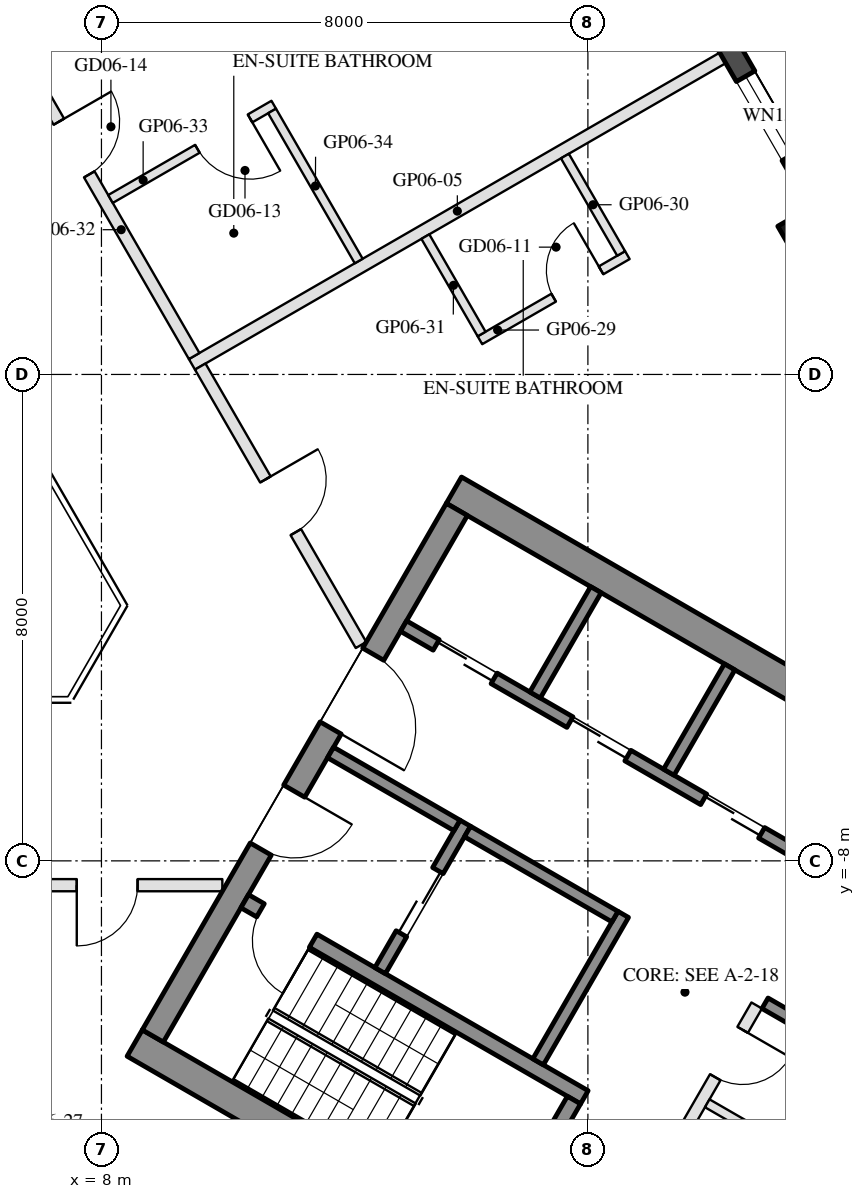
"""IFC4 building model, lengths in metres.
Left out: names, types, materials, properties, quantities, classifications, styles, units other than length and angle.
Written with IfcOpenShell. Run it as: python <this file> out.ifc"""

import sys

from ifc_helpers import new_model, si_unit, direction, frame, frame_2d, origin, origin_2d, place, context, subcontext, project, spatial, rectangle, hollow_rectangle, extrude, element, fill, save


model = new_model("IFC4")
c1 = context("Model", 3, precision=1e-05, world=origin(), true_north=direction((0.0, 1.0)))
c2 = subcontext(c1, "Body", "Model", "MODEL_VIEW")
j1 = project(units=[si_unit("LENGTHUNIT", "METRE"), si_unit("PLANEANGLEUNIT", "RADIAN")], contexts=[c1])
p1 = place(None, origin())
s1 = spatial("IfcSite", under=j1, at=p1, CompositionType="ELEMENT")
p2 = place(p1, origin())
s2 = spatial("IfcBuilding", under=s1, at=p2, CompositionType="ELEMENT")
p3 = place(p2, frame((0.0, 0.0, 87.2)))
s3 = spatial("IfcBuildingStorey", under=s2, at=p3, CompositionType="ELEMENT", Elevation=87.2)
p4 = place(p3, frame((19.738, 2.273, 0.0), z_axis=(0.0, 0.0, 1.0), x_axis=(-0.5, 0.866025403784, 0.0)))
e1 = element("IfcColumn", 1, at=p4, inside=s3, PredefinedType="COLUMN", context=c2, shape_type="SweptSolid", body=[
    extrude(hollow_rectangle(XDim=0.9, YDim=0.9, WallThickness=0.04, at=origin_2d()), origin(), (0.0, 0.0, 1.0), 3.7),
])
p5 = place(p3, frame((19.729, 2.938, 0.0), z_axis=(0.0, 0.0, 1.0), x_axis=(-0.499976430342, 0.866039011305, 0.0)))
e2 = element("IfcWall", 2, at=p5, inside=s3, PredefinedType="SOLIDWALL", context=c2, shape_type="SweptSolid", body=[
    extrude(rectangle(XDim=6.74, YDim=0.35, at=frame_2d((3.37, 0.0))), origin(), (0.0, 0.0, 1.0), 3.55),
])
p6 = place(p5, frame((0.77, 0.0, 0.3)))
e3 = element("IfcOpeningElement", 3, at=p6, cuts=e2, PredefinedType="OPENING", context=c2, shape_type="SweptSolid", body=[
    extrude(rectangle(XDim=1.5, YDim=2.65, at=frame_2d((0.75, 1.325))), frame((0.0, 0.185, 0.0), z_axis=(0.0, -1.0, 0.0), x_axis=(1.0, 0.0, 0.0)), (0.0, 0.0, 1.0), 0.37),
])
p7 = place(p5, frame((3.37, 0.0, 0.0)))
e4 = element("IfcOpeningElement", 4, at=p7, cuts=e2, PredefinedType="OPENING", context=c2, shape_type="SweptSolid", body=[
    extrude(rectangle(XDim=2.4, YDim=2.4, at=frame_2d((1.2, 1.2))), frame((0.0, 0.185, 0.0), z_axis=(0.0, -1.0, 0.0), x_axis=(1.0, 0.0, 0.0)), (0.0, 0.0, 1.0), 0.37),
])
for number, where, z_axis, x_axis in (
    (5, (8.547, -10.997, 0.0), (0.0, 0.0, 1.0), (0.866, -0.5, 0.0)),
    (6, (13.797, -1.903, 0.0), (0.0, 0.0, 1.0), (0.866, -0.5, 0.0)),
):
    element("IfcWall", number, at=place(p3, frame(where, z_axis=z_axis, x_axis=x_axis)), inside=s3, PredefinedType="SHEAR", context=c2, shape_type="SweptSolid", body=[
        extrude(rectangle(XDim=14.837, YDim=0.5, at=frame_2d((7.418, 0.0))), origin(), (0.0, 0.0, 1.0), 3.5),
    ])
p8 = place(p3, frame((8.845, -10.88, 0.0), z_axis=(0.0, 0.0, 1.0), x_axis=(0.500004234368, 0.866022959057, 0.0)))
e7 = element("IfcWall", 7, at=p8, inside=s3, PredefinedType="SHEAR", context=c2, shape_type="SweptSolid", body=[
    extrude(rectangle(XDim=10.0, YDim=0.4, at=frame_2d((5.0, 0.0))), origin(), (0.0, 0.0, 1.0), 3.5),
])
p9 = place(p8, frame((3.55, 0.0, 0.0)))
e8 = element("IfcOpeningElement", 8, at=p9, cuts=e7, PredefinedType="OPENING", context=c2, shape_type="SweptSolid", body=[
    extrude(rectangle(XDim=1.1, YDim=2.1, at=frame_2d((0.55, 1.05))), frame((0.0, 0.21, 0.0), z_axis=(0.0, -1.0, 0.0), x_axis=(1.0, 0.0, 0.0)), (0.0, 0.0, 1.0), 0.42),
])
p10 = place(p8, frame((5.85, 0.0, 0.0)))
e9 = element("IfcOpeningElement", 9, at=p10, cuts=e7, PredefinedType="OPENING", context=c2, shape_type="SweptSolid", body=[
    extrude(rectangle(XDim=1.4, YDim=2.1, at=frame_2d((0.7, 1.05))), frame((0.0, 0.21, 0.0), z_axis=(0.0, -1.0, 0.0), x_axis=(1.0, 0.0, 0.0)), (0.0, 0.0, 1.0), 0.42),
])
p11 = place(p3, frame((10.356, -8.664, 0.0), z_axis=(0.0, 0.0, 1.0), x_axis=(0.866028629588, -0.499994412703, 0.0)))
e10 = element("IfcWall", 10, at=p11, inside=s3, PredefinedType="SHEAR", context=c2, shape_type="SweptSolid", body=[
    extrude(rectangle(XDim=6.45, YDim=0.25, at=frame_2d((3.225, 0.0))), origin(), (0.0, 0.0, 1.0), 3.5),
])
p12 = place(p11, frame((0.3, 0.0, 0.0)))
e11 = element("IfcOpeningElement", 11, at=p12, cuts=e10, PredefinedType="OPENING", context=c2, shape_type="SweptSolid", body=[
    extrude(rectangle(XDim=1.0, YDim=2.1, at=frame_2d((0.5, 1.05))), frame((0.0, 0.135, 0.0), z_axis=(0.0, -1.0, 0.0), x_axis=(1.0, 0.0, 0.0)), (0.0, 0.0, 1.0), 0.27),
])
p13 = place(p3, frame((14.496, -14.143, 0.0), z_axis=(0.0, 0.0, 1.0), x_axis=(0.500062241894, 0.865989465428, 0.0)))
e12 = element("IfcWall", 12, at=p13, inside=s3, PredefinedType="SHEAR", context=c2, shape_type="SweptSolid", body=[
    extrude(rectangle(XDim=2.55, YDim=0.25, at=frame_2d((1.275, 0.0))), origin(), (0.0, 0.0, 1.0), 3.5),
])
p14 = place(p3, frame((15.181, -11.305, 0.0), z_axis=(0.0, 0.0, 1.0), x_axis=(0.49994636267, 0.866056369097, 0.0)))
e13 = element("IfcWall", 13, at=p14, inside=s3, PredefinedType="SHEAR", context=c2, shape_type="SweptSolid", body=[
    extrude(rectangle(XDim=2.8, YDim=0.2, at=frame_2d((1.4, 0.0))), origin(), (0.0, 0.0, 1.0), 3.5),
])
p15 = place(p3, frame((12.583, -9.805, 0.0), z_axis=(0.0, 0.0, 1.0), x_axis=(0.49994636267, 0.866056369097, 0.0)))
e14 = element("IfcWall", 14, at=p15, inside=s3, PredefinedType="SHEAR", context=c2, shape_type="SweptSolid", body=[
    extrude(rectangle(XDim=2.8, YDim=0.2, at=frame_2d((1.4, 0.0))), origin(), (0.0, 0.0, 1.0), 3.5),
])
p16 = place(p15, frame((0.7, 0.0, 0.0)))
e15 = element("IfcOpeningElement", 15, at=p16, cuts=e14, PredefinedType="OPENING", context=c2, shape_type="SweptSolid", body=[
    extrude(rectangle(XDim=1.2, YDim=2.1, at=frame_2d((0.6, 1.05))), frame((0.0, 0.11, 0.0), z_axis=(0.0, -1.0, 0.0), x_axis=(1.0, 0.0, 0.0)), (0.0, 0.0, 1.0), 0.22),
])
p17 = place(p3, frame((11.768, -6.217, 0.0), z_axis=(0.0, 0.0, 1.0), x_axis=(0.866050077142, -0.499957262057, 0.0)))
e16 = element("IfcWall", 16, at=p17, inside=s3, PredefinedType="SHEAR", context=c2, shape_type="SweptSolid", body=[
    extrude(rectangle(XDim=2.4, YDim=0.2, at=frame_2d((1.2, 0.0))), origin(), (0.0, 0.0, 1.0), 3.5),
])
p18 = place(p3, frame((14.02, -7.517, 0.0), z_axis=(0.0, 0.0, 1.0), x_axis=(0.866034573852, -0.49998411664, 0.0)))
e17 = element("IfcWall", 17, at=p18, inside=s3, PredefinedType="SHEAR", context=c2, shape_type="SweptSolid", body=[
    extrude(rectangle(XDim=2.8, YDim=0.2, at=frame_2d((1.4, 0.0))), origin(), (0.0, 0.0, 1.0), 3.5),
])
p19 = place(p3, frame((12.968, -4.138, 0.0), z_axis=(0.0, 0.0, 1.0), x_axis=(0.866028328073, -0.49999493495, 0.0)))
e18 = element("IfcWall", 18, at=p19, inside=s3, PredefinedType="SHEAR", context=c2, shape_type="SweptSolid", body=[
    extrude(rectangle(XDim=10.16, YDim=0.2, at=frame_2d((5.08, 0.0))), origin(), (0.0, 0.0, 1.0), 3.5),
])
p20 = place(p19, frame((0.62, 0.0, 0.0)))
e19 = element("IfcOpeningElement", 19, at=p20, cuts=e18, PredefinedType="OPENING", context=c2, shape_type="SweptSolid", body=[
    extrude(rectangle(XDim=1.1, YDim=2.1, at=frame_2d((0.55, 1.05))), frame((0.0, 0.11, 0.0), z_axis=(0.0, -1.0, 0.0), x_axis=(1.0, 0.0, 0.0)), (0.0, 0.0, 1.0), 0.22),
])
p21 = place(p19, frame((3.16, 0.0, 0.0)))
e20 = element("IfcOpeningElement", 20, at=p21, cuts=e18, PredefinedType="OPENING", context=c2, shape_type="SweptSolid", body=[
    extrude(rectangle(XDim=1.1, YDim=2.1, at=frame_2d((0.55, 1.05))), frame((0.0, 0.11, 0.0), z_axis=(0.0, -1.0, 0.0), x_axis=(1.0, 0.0, 0.0)), (0.0, 0.0, 1.0), 0.22),
])
p22 = place(p19, frame((5.7, 0.0, 0.0)))
e21 = element("IfcOpeningElement", 21, at=p22, cuts=e18, PredefinedType="OPENING", context=c2, shape_type="SweptSolid", body=[
    extrude(rectangle(XDim=1.1, YDim=2.1, at=frame_2d((0.55, 1.05))), frame((0.0, 0.11, 0.0), z_axis=(0.0, -1.0, 0.0), x_axis=(1.0, 0.0, 0.0)), (0.0, 0.0, 1.0), 0.22),
])
p23 = place(p19, frame((8.24, 0.0, 0.0)))
e22 = element("IfcOpeningElement", 22, at=p23, cuts=e18, PredefinedType="OPENING", context=c2, shape_type="SweptSolid", body=[
    extrude(rectangle(XDim=1.1, YDim=2.1, at=frame_2d((0.55, 1.05))), frame((0.0, 0.11, 0.0), z_axis=(0.0, -1.0, 0.0), x_axis=(1.0, 0.0, 0.0)), (0.0, 0.0, 1.0), 0.22),
])
p24 = place(p3, frame((18.913, -10.342, 0.0), z_axis=(0.0, 0.0, 1.0), x_axis=(0.866038183914, -0.499977863513, 0.0)))
e23 = element("IfcWall", 23, at=p24, inside=s3, PredefinedType="SHEAR", context=c2, shape_type="SweptSolid", body=[
    extrude(rectangle(XDim=1.71, YDim=0.2, at=frame_2d((0.855, 0.0))), origin(), (0.0, 0.0, 1.0), 3.5),
])
for number, where, z_axis, x_axis in (
    (24, (15.131, -5.272, 0.0), (0.0, 0.0, 1.0), (0.5, 0.866, 0.0)),
    (25, (17.331, -6.542, 0.0), (0.0, 0.0, 1.0), (0.5, 0.866, 0.0)),
):
    element("IfcWall", number, at=place(p3, frame(where, z_axis=z_axis, x_axis=x_axis)), inside=s3, PredefinedType="SHEAR", context=c2, shape_type="SweptSolid", body=[
        extrude(rectangle(XDim=2.0, YDim=0.2, at=frame_2d((1.0, 0.0))), origin(), (0.0, 0.0, 1.0), 3.5),
    ])
p25 = place(p3, frame((16.076, -15.055, 0.0), z_axis=(0.0, 0.0, 1.0), x_axis=(0.499995103361, 0.866028230842, 0.0)))
e26 = element("IfcWall", 26, at=p25, inside=s3, PredefinedType="PARTITIONING", context=c2, shape_type="SweptSolid", body=[
    extrude(rectangle(XDim=5.4, YDim=0.2, at=frame_2d((2.7, 0.0))), origin(), (0.0, 0.0, 1.0), 3.5),
])
p26 = place(p25, frame((2.163, 0.0, 0.0)))
e27 = element("IfcOpeningElement", 27, at=p26, cuts=e26, PredefinedType="OPENING", context=c2, shape_type="SweptSolid", body=[
    extrude(rectangle(XDim=0.9, YDim=2.1, at=frame_2d((0.45, 1.05))), frame((0.0, 0.11, 0.0), z_axis=(0.0, -1.0, 0.0), x_axis=(1.0, 0.0, 0.0)), (0.0, 0.0, 1.0), 0.22),
])
p27 = place(p25, frame((4.038, 0.0, 0.0)))
e28 = element("IfcOpeningElement", 28, at=p27, cuts=e26, PredefinedType="OPENING", context=c2, shape_type="SweptSolid", body=[
    extrude(rectangle(XDim=0.9, YDim=2.1, at=frame_2d((0.45, 1.05))), frame((0.0, 0.11, 0.0), z_axis=(0.0, -1.0, 0.0), x_axis=(1.0, 0.0, 0.0)), (0.0, 0.0, 1.0), 0.22),
])
p28 = place(p3, frame((17.963, -11.987, 0.0), z_axis=(0.0, 0.0, 1.0), x_axis=(0.865998608524, -0.500046407882, 0.0)))
e29 = element("IfcWall", 29, at=p28, inside=s3, PredefinedType="PARTITIONING", context=c2, shape_type="SweptSolid", body=[
    extrude(rectangle(XDim=4.61, YDim=0.15, at=frame_2d((2.305, 0.0))), origin(), (0.0, 0.0, 1.0), 3.5),
])
p29 = place(p3, frame((18.218, 5.206, 0.0), z_axis=(0.0, 0.0, 1.0), x_axis=(-0.866022637375, -0.500004791531, 0.0)))
e30 = element("IfcWall", 30, at=p29, inside=s3, PredefinedType="PARTITIONING", context=c2, shape_type="SweptSolid", body=[
    extrude(rectangle(XDim=10.08, YDim=0.2, at=frame_2d((5.04, 0.0))), origin(), (0.0, 0.0, 1.0), 2.96),
])
p30 = place(p3, frame((9.988, -8.4, 0.0), z_axis=(0.0, 0.0, 1.0), x_axis=(-1.0, 0.0, 0.0)))
e31 = element("IfcWall", 31, at=p30, inside=s3, PredefinedType="PARTITIONING", context=c2, shape_type="SweptSolid", body=[
    extrude(rectangle(XDim=3.788, YDim=0.2, at=frame_2d((1.894, 0.0))), origin(), (0.0, 0.0, 1.0), 2.95),
])
p31 = place(p30, frame((1.394, 0.0, 0.0)))
e32 = element("IfcOpeningElement", 32, at=p31, cuts=e31, PredefinedType="OPENING", context=c2, shape_type="SweptSolid", body=[
    extrude(rectangle(XDim=1.0, YDim=2.1, at=frame_2d((0.5, 1.05))), frame((0.0, 0.11, 0.0), z_axis=(0.0, -1.0, 0.0), x_axis=(1.0, 0.0, 0.0)), (0.0, 0.0, 1.0), 0.22),
])
p32 = place(p3, frame((9.625, 0.13, 0.0), z_axis=(0.0, 0.0, 1.0), x_axis=(0.500036828865, -0.866004139585, 0.0)))
e33 = element("IfcWall", 33, at=p32, inside=s3, PredefinedType="PARTITIONING", context=c2, shape_type="SweptSolid", body=[
    extrude(rectangle(XDim=5.288, YDim=0.2, at=frame_2d((2.644, 0.0))), origin(), (0.0, 0.0, 1.0), 2.95),
])
p33 = place(p32, frame((2.144, 0.0, 0.0)))
e34 = element("IfcOpeningElement", 34, at=p33, cuts=e33, PredefinedType="OPENING", context=c2, shape_type="SweptSolid", body=[
    extrude(rectangle(XDim=1.0, YDim=2.1, at=frame_2d((0.5, 1.05))), frame((0.0, 0.11, 0.0), z_axis=(0.0, -1.0, 0.0), x_axis=(1.0, 0.0, 0.0)), (0.0, 0.0, 1.0), 0.22),
])
p34 = place(p3, frame((14.224, 0.562, 0.0), z_axis=(0.0, 0.0, 1.0), x_axis=(0.866018616679, 0.500011755427, 0.0)))
e35 = element("IfcWall", 35, at=p34, inside=s3, PredefinedType="PARTITIONING", context=c2, shape_type="SweptSolid", body=[
    extrude(rectangle(XDim=2.8, YDim=0.15, at=frame_2d((1.4, 0.0))), origin(), (0.0, 0.0, 1.0), 3.55),
])
p35 = place(p34, frame((1.4, 0.0, 0.0)))
e36 = element("IfcOpeningElement", 36, at=p35, cuts=e35, PredefinedType="OPENING", context=c2, shape_type="SweptSolid", body=[
    extrude(rectangle(XDim=0.9, YDim=2.1, at=frame_2d((0.45, 1.05))), frame((0.0, 0.085, 0.0), z_axis=(0.0, -1.0, 0.0), x_axis=(1.0, 0.0, 0.0)), (0.0, 0.0, 1.0), 0.17),
])
p36 = place(p3, frame((16.547, 1.99, 0.0), z_axis=(0.0, 0.0, 1.0), x_axis=(-0.499985172903, 0.866033964044, 0.0)))
e37 = element("IfcWall", 37, at=p36, inside=s3, PredefinedType="PARTITIONING", context=c2, shape_type="SweptSolid", body=[
    extrude(rectangle(XDim=1.85, YDim=0.15, at=frame_2d((0.925, 0.0))), origin(), (0.0, 0.0, 1.0), 3.55),
])
p37 = place(p3, frame((14.252, 0.665, 0.0), z_axis=(0.0, 0.0, 1.0), x_axis=(-0.500042316284, 0.866000971088, 0.0)))
e38 = element("IfcWall", 38, at=p37, inside=s3, PredefinedType="PARTITIONING", context=c2, shape_type="SweptSolid", body=[
    extrude(rectangle(XDim=1.85, YDim=0.15, at=frame_2d((0.925, 0.0))), origin(), (0.0, 0.0, 1.0), 3.55),
])
p38 = place(p3, frame((6.526, 5.497, 0.0), z_axis=(0.0, 0.0, 1.0), x_axis=(0.500026652407, -0.866010015463, 0.0)))
e39 = element("IfcWall", 39, at=p38, inside=s3, PredefinedType="PARTITIONING", context=c2, shape_type="SweptSolid", body=[
    extrude(rectangle(XDim=5.998, YDim=0.2, at=frame_2d((2.999, 0.0))), origin(), (0.0, 0.0, 1.0), 2.95),
])
p39 = place(p38, frame((1.548, 0.0, 0.0)))
e40 = element("IfcOpeningElement", 40, at=p39, cuts=e39, PredefinedType="OPENING", context=c2, shape_type="SweptSolid", body=[
    extrude(rectangle(XDim=1.0, YDim=2.1, at=frame_2d((0.5, 1.05))), frame((0.0, 0.11, 0.0), z_axis=(0.0, -1.0, 0.0), x_axis=(1.0, 0.0, 0.0)), (0.0, 0.0, 1.0), 0.22),
])
p40 = place(p3, frame((10.833, 4.436, 0.0), z_axis=(0.0, 0.0, 1.0), x_axis=(-0.86602952684, -0.49999285859, 0.0)))
e41 = element("IfcWall", 41, at=p40, inside=s3, PredefinedType="PARTITIONING", context=c2, shape_type="SweptSolid", body=[
    extrude(rectangle(XDim=3.1, YDim=0.15, at=frame_2d((1.55, 0.0))), origin(), (0.0, 0.0, 1.0), 3.55),
])
p41 = place(p40, frame((0.45, 0.0, 0.0)))
e42 = element("IfcOpeningElement", 42, at=p41, cuts=e41, PredefinedType="OPENING", context=c2, shape_type="SweptSolid", body=[
    extrude(rectangle(XDim=1.0, YDim=2.1, at=frame_2d((0.5, 1.05))), frame((0.0, 0.085, 0.0), z_axis=(0.0, -1.0, 0.0), x_axis=(1.0, 0.0, 0.0)), (0.0, 0.0, 1.0), 0.17),
])
p42 = place(p3, frame((12.231, 1.865, 0.0), z_axis=(0.0, 0.0, 1.0), x_axis=(-0.500036373335, 0.866004402611, 0.0)))
e43 = element("IfcWall", 43, at=p42, inside=s3, PredefinedType="PARTITIONING", context=c2, shape_type="SweptSolid", body=[
    extrude(rectangle(XDim=2.85, YDim=0.15, at=frame_2d((1.425, 0.0))), origin(), (0.0, 0.0, 1.0), 2.95),
])
p43 = place(p6, origin())
e44 = element("IfcWindow", 44, at=p43, inside=s3, PartitioningType="SINGLE_PANEL", PredefinedType="WINDOW", context=c2, shape_type="SweptSolid", body=[
    extrude(rectangle(XDim=1.5, YDim=2.65, at=frame_2d((0.75, 1.325))), frame((0.0, 0.03, 0.0), z_axis=(0.0, -1.0, 0.0), x_axis=(1.0, 0.0, 0.0)), (0.0, 0.0, 1.0), 0.06),
])
fill(e3, e44)
p44 = place(p16, origin())
e45 = element("IfcDoor", 45, at=p44, inside=s3, OperationType="DOUBLE_DOOR_SLIDING", PredefinedType="DOOR", context=c2, shape_type="SweptSolid", body=[
    extrude(rectangle(XDim=1.2, YDim=2.1, at=frame_2d((0.6, 1.05))), frame((0.0, 0.025, 0.0), z_axis=(0.0, -1.0, 0.0), x_axis=(1.0, 0.0, 0.0)), (0.0, 0.0, 1.0), 0.05),
])
fill(e15, e45)
p45 = place(p20, origin())
e46 = element("IfcDoor", 46, at=p45, inside=s3, OperationType="DOUBLE_DOOR_SLIDING", PredefinedType="DOOR", context=c2, shape_type="SweptSolid", body=[
    extrude(rectangle(XDim=1.1, YDim=2.1, at=frame_2d((0.55, 1.05))), frame((0.0, 0.025, 0.0), z_axis=(0.0, -1.0, 0.0), x_axis=(1.0, 0.0, 0.0)), (0.0, 0.0, 1.0), 0.05),
])
fill(e19, e46)
p46 = place(p21, origin())
e47 = element("IfcDoor", 47, at=p46, inside=s3, OperationType="DOUBLE_DOOR_SLIDING", PredefinedType="DOOR", context=c2, shape_type="SweptSolid", body=[
    extrude(rectangle(XDim=1.1, YDim=2.1, at=frame_2d((0.55, 1.05))), frame((0.0, 0.025, 0.0), z_axis=(0.0, -1.0, 0.0), x_axis=(1.0, 0.0, 0.0)), (0.0, 0.0, 1.0), 0.05),
])
fill(e20, e47)
p47 = place(p22, origin())
e48 = element("IfcDoor", 48, at=p47, inside=s3, OperationType="DOUBLE_DOOR_SLIDING", PredefinedType="DOOR", context=c2, shape_type="SweptSolid", body=[
    extrude(rectangle(XDim=1.1, YDim=2.1, at=frame_2d((0.55, 1.05))), frame((0.0, 0.025, 0.0), z_axis=(0.0, -1.0, 0.0), x_axis=(1.0, 0.0, 0.0)), (0.0, 0.0, 1.0), 0.05),
])
fill(e21, e48)
p48 = place(p27, frame((0.9, 0.0, 0.0), z_axis=(0.0, 0.0, 1.0), x_axis=(-1.0, 0.0, 0.0)))
e49 = element("IfcDoor", 49, at=p48, inside=s3, OperationType="SINGLE_SWING_LEFT", PredefinedType="DOOR", context=c2, shape_type="SweptSolid", body=[
    extrude(rectangle(XDim=0.9, YDim=2.1, at=frame_2d((0.45, 1.05))), frame((0.0, 0.025, 0.0), z_axis=(0.0, -1.0, 0.0), x_axis=(1.0, 0.0, 0.0)), (0.0, 0.0, 1.0), 0.05),
])
fill(e28, e49)
p49 = place(p9, frame((1.1, 0.0, 0.0), z_axis=(0.0, 0.0, 1.0), x_axis=(-1.0, 0.0, 0.0)))
e50 = element("IfcDoor", 50, at=p49, inside=s3, OperationType="SINGLE_SWING_LEFT", PredefinedType="DOOR", context=c2, shape_type="SweptSolid", body=[
    extrude(rectangle(XDim=1.1, YDim=2.1, at=frame_2d((0.55, 1.05))), frame((0.0, 0.025, 0.0), z_axis=(0.0, -1.0, 0.0), x_axis=(1.0, 0.0, 0.0)), (0.0, 0.0, 1.0), 0.05),
])
fill(e8, e50)
p50 = place(p10, frame((1.4, 0.0, 0.0), z_axis=(0.0, 0.0, 1.0), x_axis=(-1.0, 0.0, 0.0)))
e51 = element("IfcDoor", 51, at=p50, inside=s3, OperationType="DOUBLE_DOOR_SINGLE_SWING", PredefinedType="DOOR", context=c2, shape_type="SweptSolid", body=[
    extrude(rectangle(XDim=1.4, YDim=2.1, at=frame_2d((0.7, 1.05))), frame((0.0, 0.025, 0.0), z_axis=(0.0, -1.0, 0.0), x_axis=(1.0, 0.0, 0.0)), (0.0, 0.0, 1.0), 0.05),
])
fill(e9, e51)
p51 = place(p12, frame((1.0, 0.0, 0.0), z_axis=(0.0, 0.0, 1.0), x_axis=(-1.0, 0.0, 0.0)))
e52 = element("IfcDoor", 52, at=p51, inside=s3, OperationType="SINGLE_SWING_LEFT", PredefinedType="DOOR", context=c2, shape_type="SweptSolid", body=[
    extrude(rectangle(XDim=1.0, YDim=2.1, at=frame_2d((0.5, 1.05))), frame((0.0, 0.025, 0.0), z_axis=(0.0, -1.0, 0.0), x_axis=(1.0, 0.0, 0.0)), (0.0, 0.0, 1.0), 0.05),
])
fill(e11, e52)
p52 = place(p31, origin())
e53 = element("IfcDoor", 53, at=p52, inside=s3, OperationType="SINGLE_SWING_RIGHT", PredefinedType="DOOR", context=c2, shape_type="SweptSolid", body=[
    extrude(rectangle(XDim=1.0, YDim=2.1, at=frame_2d((0.5, 1.05))), frame((0.0, 0.025, 0.0), z_axis=(0.0, -1.0, 0.0), x_axis=(1.0, 0.0, 0.0)), (0.0, 0.0, 1.0), 0.05),
])
fill(e32, e53)
p53 = place(p35, origin())
e54 = element("IfcDoor", 54, at=p53, inside=s3, OperationType="SINGLE_SWING_RIGHT", PredefinedType="DOOR", context=c2, shape_type="SweptSolid", body=[
    extrude(rectangle(XDim=0.9, YDim=2.1, at=frame_2d((0.45, 1.05))), frame((0.0, 0.025, 0.0), z_axis=(0.0, -1.0, 0.0), x_axis=(1.0, 0.0, 0.0)), (0.0, 0.0, 1.0), 0.05),
])
fill(e36, e54)
p54 = place(p33, origin())
e55 = element("IfcDoor", 55, at=p54, inside=s3, OperationType="SINGLE_SWING_LEFT", PredefinedType="DOOR", context=c2, shape_type="SweptSolid", body=[
    extrude(rectangle(XDim=1.0, YDim=2.1, at=frame_2d((0.5, 1.05))), frame((0.0, 0.025, 0.0), z_axis=(0.0, -1.0, 0.0), x_axis=(1.0, 0.0, 0.0)), (0.0, 0.0, 1.0), 0.05),
])
fill(e34, e55)
p55 = place(p41, origin())
e56 = element("IfcDoor", 56, at=p55, inside=s3, OperationType="SINGLE_SWING_LEFT", PredefinedType="DOOR", context=c2, shape_type="SweptSolid", body=[
    extrude(rectangle(XDim=1.0, YDim=2.1, at=frame_2d((0.5, 1.05))), frame((0.0, 0.025, 0.0), z_axis=(0.0, -1.0, 0.0), x_axis=(1.0, 0.0, 0.0)), (0.0, 0.0, 1.0), 0.05),
])
fill(e42, e56)
p56 = place(p39, origin())
e57 = element("IfcDoor", 57, at=p56, inside=s3, OperationType="SINGLE_SWING_LEFT", PredefinedType="DOOR", context=c2, shape_type="SweptSolid", body=[
    extrude(rectangle(XDim=1.0, YDim=2.1, at=frame_2d((0.5, 1.05))), frame((0.0, 0.025, 0.0), z_axis=(0.0, -1.0, 0.0), x_axis=(1.0, 0.0, 0.0)), (0.0, 0.0, 1.0), 0.05),
])
fill(e40, e57)
save(model, sys.argv[1])
